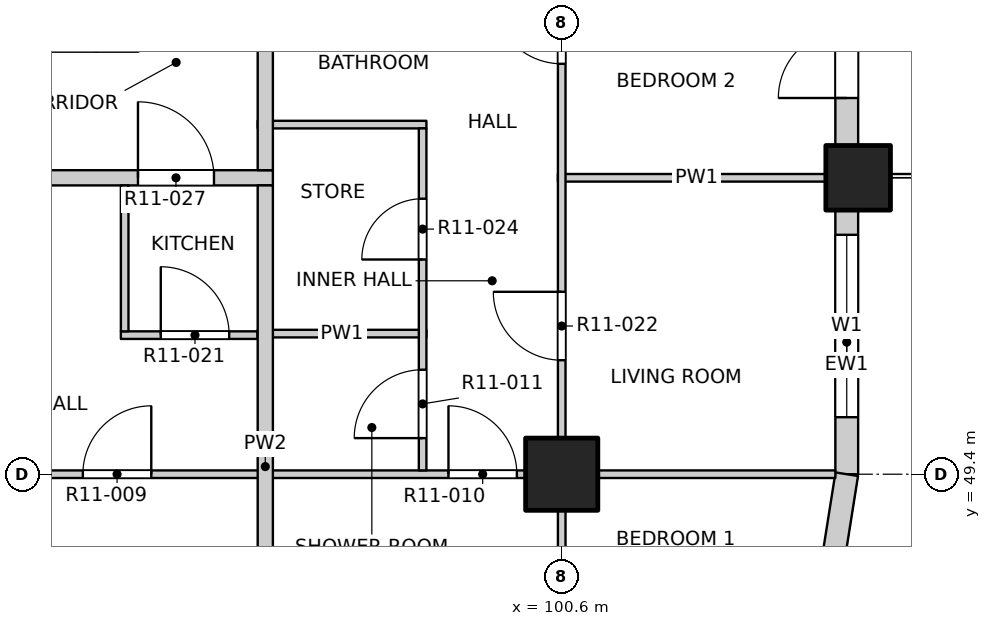
"""IFC4 building model, lengths in metres.
Left out: names, types, materials, properties, quantities, classifications, styles, units other than length and angle.
Written with IfcOpenShell. Run it as: python <this file> out.ifc"""

import sys

from ifc_helpers import new_model, si_unit, direction, frame, frame_2d, origin, origin_2d, place, context, subcontext, project, spatial, rectangle, extrude, element, fill, save


model = new_model("IFC4")
c1 = context("Model", 3, precision=1e-05, world=origin(), true_north=direction((0.0, 1.0)))
c2 = subcontext(c1, "Body", "Model", "MODEL_VIEW")
j1 = project(units=[si_unit("LENGTHUNIT", "METRE"), si_unit("PLANEANGLEUNIT", "RADIAN")], contexts=[c1])
p1 = place(None, origin())
s1 = spatial("IfcSite", under=j1, at=p1, CompositionType="ELEMENT")
p2 = place(p1, origin())
s2 = spatial("IfcBuilding", under=s1, at=p2, CompositionType="ELEMENT")
p3 = place(p2, frame((0.0, 0.0, 130.5)))
s3 = spatial("IfcBuildingStorey", under=s2, at=p3, CompositionType="ELEMENT", Elevation=130.5)
p4 = place(p3, frame((104.5, 53.3, -0.25), z_axis=(0.0, 0.0, 1.0), x_axis=(1.0, 0.0, 0.0)))
e1 = element("IfcColumn", 1, at=p4, inside=s3, PredefinedType="COLUMN", context=c2, shape_type="SweptSolid", body=[
    extrude(rectangle(XDim=0.85, YDim=0.85, at=origin_2d()), origin(), (0.0, 0.0, 1.0), 3.4),
])
p5 = place(p3, frame((100.6, 49.4, -0.25), z_axis=(0.0, 0.0, 1.0), x_axis=(1.0, 0.0, 0.0)))
e2 = element("IfcColumn", 2, at=p5, inside=s3, PredefinedType="COLUMN", context=c2, shape_type="SweptSolid", body=[
    extrude(rectangle(XDim=0.95, YDim=0.95, at=origin_2d()), origin(), (0.0, 0.0, 1.0), 3.4),
])
p6 = place(p3, frame((104.35, 49.4, 0.0), z_axis=(0.0, 0.0, 1.0), x_axis=(0.0, 1.0, 0.0)))
e3 = element("IfcWall", 3, at=p6, inside=s3, PredefinedType="SOLIDWALL", context=c2, shape_type="SweptSolid", body=[
    extrude(rectangle(XDim=3.475, YDim=0.3, at=frame_2d((1.738, 0.0))), origin(), (0.0, 0.0, 1.0), 2.7),
])
p7 = place(p6, frame((0.75, 0.0, 0.9)))
e4 = element("IfcOpeningElement", 4, at=p7, cuts=e3, PredefinedType="OPENING", context=c2, shape_type="SweptSolid", body=[
    extrude(rectangle(XDim=2.4, YDim=1.8, at=frame_2d((1.2, 0.9))), frame((0.0, 0.16, 0.0), z_axis=(0.0, -1.0, 0.0), x_axis=(1.0, 0.0, 0.0)), (0.0, 0.0, 1.0), 0.32),
])
p8 = place(p3, frame((104.35, 53.725, 0.0), z_axis=(0.0, 0.0, 1.0), x_axis=(0.0, 1.0, 0.0)))
e5 = element("IfcWall", 5, at=p8, inside=s3, PredefinedType="SOLIDWALL", context=c2, shape_type="SweptSolid", body=[
    extrude(rectangle(XDim=6.95, YDim=0.3, at=frame_2d((3.475, 0.0))), origin(), (0.0, 0.0, 1.0), 2.7),
])
p9 = place(p8, frame((0.625, 0.0, 0.0)))
e6 = element("IfcOpeningElement", 6, at=p9, cuts=e5, PredefinedType="OPENING", context=c2, shape_type="SweptSolid", body=[
    extrude(rectangle(XDim=1.8, YDim=2.4, at=frame_2d((0.9, 1.2))), frame((0.0, 0.16, 0.0), z_axis=(0.0, -1.0, 0.0), x_axis=(1.0, 0.0, 0.0)), (0.0, 0.0, 1.0), 0.32),
])
p10 = place(p8, frame((4.225, 0.0, 0.9)))
e7 = element("IfcOpeningElement", 7, at=p10, cuts=e5, PredefinedType="OPENING", context=c2, shape_type="SweptSolid", body=[
    extrude(rectangle(XDim=2.4, YDim=1.8, at=frame_2d((1.2, 0.9))), frame((0.0, 0.16, 0.0), z_axis=(0.0, -1.0, 0.0), x_axis=(1.0, 0.0, 0.0)), (0.0, 0.0, 1.0), 0.32),
])
p11 = place(p3, frame((104.167, 48.241, 0.0), z_axis=(0.0, 0.0, 1.0), x_axis=(0.156496880861, 0.987678452879, 0.0)))
e8 = element("IfcWall", 8, at=p11, inside=s3, PredefinedType="SOLIDWALL", context=c2, shape_type="SweptSolid", body=[
    extrude(rectangle(XDim=1.173, YDim=0.3, at=frame_2d((0.586, 0.0))), origin(), (0.0, 0.0, 1.0), 2.7),
])
p12 = place(p3, frame((65.8, 49.4, 0.0), z_axis=(0.0, 0.0, 1.0), x_axis=(1.0, 0.0, 0.0)))
e9 = element("IfcWall", 9, at=p12, inside=s3, PredefinedType="PARTITIONING", context=c2, shape_type="SweptSolid", body=[
    extrude(rectangle(XDim=38.4, YDim=0.1, at=frame_2d((19.2, 0.0))), origin(), (0.0, 0.0, 1.0), 3.15),
])
p13 = place(p12, frame((4.19, 0.0, 0.0)))
e10 = element("IfcOpeningElement", 10, at=p13, cuts=e9, PredefinedType="OPENING", context=c2, shape_type="SweptSolid", body=[
    extrude(rectangle(XDim=0.9, YDim=2.1, at=frame_2d((0.45, 1.05))), frame((0.0, 0.06, 0.0), z_axis=(0.0, -1.0, 0.0), x_axis=(1.0, 0.0, 0.0)), (0.0, 0.0, 1.0), 0.12),
])
p14 = place(p12, frame((9.0, 0.0, 0.0)))
e11 = element("IfcOpeningElement", 11, at=p14, cuts=e9, PredefinedType="OPENING", context=c2, shape_type="SweptSolid", body=[
    extrude(rectangle(XDim=0.9, YDim=2.1, at=frame_2d((0.45, 1.05))), frame((0.0, 0.06, 0.0), z_axis=(0.0, -1.0, 0.0), x_axis=(1.0, 0.0, 0.0)), (0.0, 0.0, 1.0), 0.12),
])
p15 = place(p12, frame((12.9, 0.0, 0.0)))
e12 = element("IfcOpeningElement", 12, at=p15, cuts=e9, PredefinedType="OPENING", context=c2, shape_type="SweptSolid", body=[
    extrude(rectangle(XDim=0.9, YDim=2.1, at=frame_2d((0.45, 1.05))), frame((0.0, 0.06, 0.0), z_axis=(0.0, -1.0, 0.0), x_axis=(1.0, 0.0, 0.0)), (0.0, 0.0, 1.0), 0.12),
])
p16 = place(p12, frame((16.8, 0.0, 0.0)))
e13 = element("IfcOpeningElement", 13, at=p16, cuts=e9, PredefinedType="OPENING", context=c2, shape_type="SweptSolid", body=[
    extrude(rectangle(XDim=0.9, YDim=2.1, at=frame_2d((0.45, 1.05))), frame((0.0, 0.06, 0.0), z_axis=(0.0, -1.0, 0.0), x_axis=(1.0, 0.0, 0.0)), (0.0, 0.0, 1.0), 0.12),
])
p17 = place(p12, frame((20.7, 0.0, 0.0)))
e14 = element("IfcOpeningElement", 14, at=p17, cuts=e9, PredefinedType="OPENING", context=c2, shape_type="SweptSolid", body=[
    extrude(rectangle(XDim=0.9, YDim=2.1, at=frame_2d((0.45, 1.05))), frame((0.0, 0.06, 0.0), z_axis=(0.0, -1.0, 0.0), x_axis=(1.0, 0.0, 0.0)), (0.0, 0.0, 1.0), 0.12),
])
p18 = place(p12, frame((24.6, 0.0, 0.0)))
e15 = element("IfcOpeningElement", 15, at=p18, cuts=e9, PredefinedType="OPENING", context=c2, shape_type="SweptSolid", body=[
    extrude(rectangle(XDim=0.9, YDim=2.1, at=frame_2d((0.45, 1.05))), frame((0.0, 0.06, 0.0), z_axis=(0.0, -1.0, 0.0), x_axis=(1.0, 0.0, 0.0)), (0.0, 0.0, 1.0), 0.12),
])
p19 = place(p12, frame((28.5, 0.0, 0.0)))
e16 = element("IfcOpeningElement", 16, at=p19, cuts=e9, PredefinedType="OPENING", context=c2, shape_type="SweptSolid", body=[
    extrude(rectangle(XDim=0.9, YDim=2.1, at=frame_2d((0.45, 1.05))), frame((0.0, 0.06, 0.0), z_axis=(0.0, -1.0, 0.0), x_axis=(1.0, 0.0, 0.0)), (0.0, 0.0, 1.0), 0.12),
])
p20 = place(p12, frame((33.31, 0.0, 0.0)))
e17 = element("IfcOpeningElement", 17, at=p20, cuts=e9, PredefinedType="OPENING", context=c2, shape_type="SweptSolid", body=[
    extrude(rectangle(XDim=0.9, YDim=2.1, at=frame_2d((0.45, 1.05))), frame((0.0, 0.06, 0.0), z_axis=(0.0, -1.0, 0.0), x_axis=(1.0, 0.0, 0.0)), (0.0, 0.0, 1.0), 0.12),
])
p21 = place(p3, frame((94.8, 51.23, 0.0), z_axis=(0.0, 0.0, 1.0), x_axis=(1.0, 0.0, 0.0)))
e18 = element("IfcWall", 18, at=p21, inside=s3, PredefinedType="PARTITIONING", context=c2, shape_type="SweptSolid", body=[
    extrude(rectangle(XDim=1.8, YDim=0.1, at=frame_2d((0.9, 0.0))), origin(), (0.0, 0.0, 1.0), 3.15),
])
p22 = place(p21, frame((0.525, 0.0, 0.0)))
e19 = element("IfcOpeningElement", 19, at=p22, cuts=e18, PredefinedType="OPENING", context=c2, shape_type="SweptSolid", body=[
    extrude(rectangle(XDim=0.9, YDim=2.1, at=frame_2d((0.45, 1.05))), frame((0.0, 0.06, 0.0), z_axis=(0.0, -1.0, 0.0), x_axis=(1.0, 0.0, 0.0)), (0.0, 0.0, 1.0), 0.12),
])
p23 = place(p3, frame((96.6, 51.25, 0.0), z_axis=(0.0, 0.0, 1.0), x_axis=(1.0, 0.0, 0.0)))
e20 = element("IfcWall", 20, at=p23, inside=s3, PredefinedType="PARTITIONING", context=c2, shape_type="SweptSolid", body=[
    extrude(rectangle(XDim=2.22, YDim=0.1, at=frame_2d((1.11, 0.0))), origin(), (0.0, 0.0, 1.0), 3.15),
])
p24 = place(p3, frame((73.2, 53.3, 0.0), z_axis=(0.0, 0.0, 1.0), x_axis=(1.0, 0.0, 0.0)))
e21 = element("IfcWall", 21, at=p24, inside=s3, PredefinedType="PARTITIONING", context=c2, shape_type="SweptSolid", body=[
    extrude(rectangle(XDim=23.6, YDim=0.2, at=frame_2d((11.8, 0.0))), origin(), (0.0, 0.0, 1.0), 3.15),
])
p25 = place(p24, frame((6.775, 0.0, 0.0)))
e22 = element("IfcOpeningElement", 22, at=p25, cuts=e21, PredefinedType="OPENING", context=c2, shape_type="SweptSolid", body=[
    extrude(rectangle(XDim=1.0, YDim=2.1, at=frame_2d((0.5, 1.05))), frame((0.0, 0.11, 0.0), z_axis=(0.0, -1.0, 0.0), x_axis=(1.0, 0.0, 0.0)), (0.0, 0.0, 1.0), 0.22),
])
p26 = place(p24, frame((21.825, 0.0, 0.0)))
e23 = element("IfcOpeningElement", 23, at=p26, cuts=e21, PredefinedType="OPENING", context=c2, shape_type="SweptSolid", body=[
    extrude(rectangle(XDim=1.0, YDim=2.1, at=frame_2d((0.5, 1.05))), frame((0.0, 0.11, 0.0), z_axis=(0.0, -1.0, 0.0), x_axis=(1.0, 0.0, 0.0)), (0.0, 0.0, 1.0), 0.22),
])
p27 = place(p3, frame((100.55, 53.3, 0.0), z_axis=(0.0, 0.0, 1.0), x_axis=(1.0, 0.0, 0.0)))
e24 = element("IfcWall", 24, at=p27, inside=s3, PredefinedType="PARTITIONING", context=c2, shape_type="SweptSolid", body=[
    extrude(rectangle(XDim=3.65, YDim=0.1, at=frame_2d((1.825, 0.0))), origin(), (0.0, 0.0, 1.0), 3.15),
])
p28 = place(p3, frame((96.6, 54.0, 0.0), z_axis=(0.0, 0.0, 1.0), x_axis=(1.0, 0.0, 0.0)))
e25 = element("IfcWall", 25, at=p28, inside=s3, PredefinedType="PARTITIONING", context=c2, shape_type="SweptSolid", body=[
    extrude(rectangle(XDim=2.22, YDim=0.1, at=frame_2d((1.11, 0.0))), origin(), (0.0, 0.0, 1.0), 3.15),
])
p29 = place(p3, frame((94.85, 51.28, 0.0), z_axis=(0.0, 0.0, 1.0), x_axis=(0.0, 1.0, 0.0)))
e26 = element("IfcWall", 26, at=p29, inside=s3, PredefinedType="PARTITIONING", context=c2, shape_type="SweptSolid", body=[
    extrude(rectangle(XDim=1.92, YDim=0.1, at=frame_2d((0.96, 0.0))), origin(), (0.0, 0.0, 1.0), 3.15),
])
p30 = place(p3, frame((96.7, 45.8, 0.0), z_axis=(0.0, 0.0, 1.0), x_axis=(0.0, 1.0, 0.0)))
e27 = element("IfcWall", 27, at=p30, inside=s3, PredefinedType="PARTITIONING", context=c2, shape_type="SweptSolid", body=[
    extrude(rectangle(XDim=7.4, YDim=0.2, at=frame_2d((3.7, 0.0))), origin(), (0.0, 0.0, 1.0), 3.15),
])
p31 = place(p3, frame((96.7, 53.4, 0.0), z_axis=(0.0, 0.0, 1.0), x_axis=(0.0, 1.0, 0.0)))
e28 = element("IfcWall", 28, at=p31, inside=s3, PredefinedType="PARTITIONING", context=c2, shape_type="SweptSolid", body=[
    extrude(rectangle(XDim=30.8, YDim=0.2, at=frame_2d((15.4, 0.0))), origin(), (0.0, 0.0, 1.0), 3.15),
])
p32 = place(p31, frame((1.875, 0.0, 0.0)))
e29 = element("IfcOpeningElement", 29, at=p32, cuts=e28, PredefinedType="OPENING", context=c2, shape_type="SweptSolid", body=[
    extrude(rectangle(XDim=1.0, YDim=2.1, at=frame_2d((0.5, 1.05))), frame((0.0, 0.11, 0.0), z_axis=(0.0, -1.0, 0.0), x_axis=(1.0, 0.0, 0.0)), (0.0, 0.0, 1.0), 0.22),
])
p33 = place(p31, frame((10.875, 0.0, 0.0)))
e30 = element("IfcOpeningElement", 30, at=p33, cuts=e28, PredefinedType="OPENING", context=c2, shape_type="SweptSolid", body=[
    extrude(rectangle(XDim=1.0, YDim=2.1, at=frame_2d((0.5, 1.05))), frame((0.0, 0.11, 0.0), z_axis=(0.0, -1.0, 0.0), x_axis=(1.0, 0.0, 0.0)), (0.0, 0.0, 1.0), 0.22),
])
p34 = place(p31, frame((25.725, 0.0, 0.0)))
e31 = element("IfcOpeningElement", 31, at=p34, cuts=e28, PredefinedType="OPENING", context=c2, shape_type="SweptSolid", body=[
    extrude(rectangle(XDim=1.0, YDim=2.1, at=frame_2d((0.5, 1.05))), frame((0.0, 0.11, 0.0), z_axis=(0.0, -1.0, 0.0), x_axis=(1.0, 0.0, 0.0)), (0.0, 0.0, 1.0), 0.22),
])
p35 = place(p3, frame((98.77, 49.45, 0.0), z_axis=(0.0, 0.0, 1.0), x_axis=(0.0, 1.0, 0.0)))
e32 = element("IfcWall", 32, at=p35, inside=s3, PredefinedType="PARTITIONING", context=c2, shape_type="SweptSolid", body=[
    extrude(rectangle(XDim=4.5, YDim=0.1, at=frame_2d((2.25, 0.0))), origin(), (0.0, 0.0, 1.0), 3.15),
])
p36 = place(p35, frame((0.425, 0.0, 0.0)))
e33 = element("IfcOpeningElement", 33, at=p36, cuts=e32, PredefinedType="OPENING", context=c2, shape_type="SweptSolid", body=[
    extrude(rectangle(XDim=0.9, YDim=2.1, at=frame_2d((0.45, 1.05))), frame((0.0, 0.06, 0.0), z_axis=(0.0, -1.0, 0.0), x_axis=(1.0, 0.0, 0.0)), (0.0, 0.0, 1.0), 0.12),
])
p37 = place(p35, frame((2.775, 0.0, 0.0)))
e34 = element("IfcOpeningElement", 34, at=p37, cuts=e32, PredefinedType="OPENING", context=c2, shape_type="SweptSolid", body=[
    extrude(rectangle(XDim=0.8, YDim=2.1, at=frame_2d((0.4, 1.05))), frame((0.0, 0.06, 0.0), z_axis=(0.0, -1.0, 0.0), x_axis=(1.0, 0.0, 0.0)), (0.0, 0.0, 1.0), 0.12),
])
p38 = place(p3, frame((100.6, 45.8, 0.0), z_axis=(0.0, 0.0, 1.0), x_axis=(0.0, 1.0, 0.0)))
e35 = element("IfcWall", 35, at=p38, inside=s3, PredefinedType="PARTITIONING", context=c2, shape_type="SweptSolid", body=[
    extrude(rectangle(XDim=38.4, YDim=0.1, at=frame_2d((19.2, 0.0))), origin(), (0.0, 0.0, 1.0), 3.15),
])
p39 = place(p38, frame((1.05, 0.0, 0.0)))
e36 = element("IfcOpeningElement", 36, at=p39, cuts=e35, PredefinedType="OPENING", context=c2, shape_type="SweptSolid", body=[
    extrude(rectangle(XDim=1.2, YDim=2.1, at=frame_2d((0.6, 1.05))), frame((0.0, 0.06, 0.0), z_axis=(0.0, -1.0, 0.0), x_axis=(1.0, 0.0, 0.0)), (0.0, 0.0, 1.0), 0.12),
])
p40 = place(p38, frame((5.1, 0.0, 0.0)))
e37 = element("IfcOpeningElement", 37, at=p40, cuts=e35, PredefinedType="OPENING", context=c2, shape_type="SweptSolid", body=[
    extrude(rectangle(XDim=0.9, YDim=2.1, at=frame_2d((0.45, 1.05))), frame((0.0, 0.06, 0.0), z_axis=(0.0, -1.0, 0.0), x_axis=(1.0, 0.0, 0.0)), (0.0, 0.0, 1.0), 0.12),
])
p41 = place(p38, frame((9.0, 0.0, 0.0)))
e38 = element("IfcOpeningElement", 38, at=p41, cuts=e35, PredefinedType="OPENING", context=c2, shape_type="SweptSolid", body=[
    extrude(rectangle(XDim=0.9, YDim=2.1, at=frame_2d((0.45, 1.05))), frame((0.0, 0.06, 0.0), z_axis=(0.0, -1.0, 0.0), x_axis=(1.0, 0.0, 0.0)), (0.0, 0.0, 1.0), 0.12),
])
p42 = place(p38, frame((12.9, 0.0, 0.0)))
e39 = element("IfcOpeningElement", 39, at=p42, cuts=e35, PredefinedType="OPENING", context=c2, shape_type="SweptSolid", body=[
    extrude(rectangle(XDim=0.9, YDim=2.1, at=frame_2d((0.45, 1.05))), frame((0.0, 0.06, 0.0), z_axis=(0.0, -1.0, 0.0), x_axis=(1.0, 0.0, 0.0)), (0.0, 0.0, 1.0), 0.12),
])
p43 = place(p38, frame((16.8, 0.0, 0.0)))
e40 = element("IfcOpeningElement", 40, at=p43, cuts=e35, PredefinedType="OPENING", context=c2, shape_type="SweptSolid", body=[
    extrude(rectangle(XDim=0.9, YDim=2.1, at=frame_2d((0.45, 1.05))), frame((0.0, 0.06, 0.0), z_axis=(0.0, -1.0, 0.0), x_axis=(1.0, 0.0, 0.0)), (0.0, 0.0, 1.0), 0.12),
])
p44 = place(p38, frame((20.7, 0.0, 0.0)))
e41 = element("IfcOpeningElement", 41, at=p44, cuts=e35, PredefinedType="OPENING", context=c2, shape_type="SweptSolid", body=[
    extrude(rectangle(XDim=0.9, YDim=2.1, at=frame_2d((0.45, 1.05))), frame((0.0, 0.06, 0.0), z_axis=(0.0, -1.0, 0.0), x_axis=(1.0, 0.0, 0.0)), (0.0, 0.0, 1.0), 0.12),
])
p45 = place(p38, frame((24.6, 0.0, 0.0)))
e42 = element("IfcOpeningElement", 42, at=p45, cuts=e35, PredefinedType="OPENING", context=c2, shape_type="SweptSolid", body=[
    extrude(rectangle(XDim=0.9, YDim=2.1, at=frame_2d((0.45, 1.05))), frame((0.0, 0.06, 0.0), z_axis=(0.0, -1.0, 0.0), x_axis=(1.0, 0.0, 0.0)), (0.0, 0.0, 1.0), 0.12),
])
p46 = place(p38, frame((30.3, 0.0, 0.0)))
e43 = element("IfcOpeningElement", 43, at=p46, cuts=e35, PredefinedType="OPENING", context=c2, shape_type="SweptSolid", body=[
    extrude(rectangle(XDim=1.2, YDim=2.1, at=frame_2d((0.6, 1.05))), frame((0.0, 0.06, 0.0), z_axis=(0.0, -1.0, 0.0), x_axis=(1.0, 0.0, 0.0)), (0.0, 0.0, 1.0), 0.12),
])
p47 = place(p38, frame((36.15, 0.0, 0.0)))
e44 = element("IfcOpeningElement", 44, at=p47, cuts=e35, PredefinedType="OPENING", context=c2, shape_type="SweptSolid", body=[
    extrude(rectangle(XDim=1.2, YDim=2.1, at=frame_2d((0.6, 1.05))), frame((0.0, 0.06, 0.0), z_axis=(0.0, -1.0, 0.0), x_axis=(1.0, 0.0, 0.0)), (0.0, 0.0, 1.0), 0.12),
])
p48 = place(p7, origin())
e45 = element("IfcWindow", 45, at=p48, inside=s3, PartitioningType="DOUBLE_PANEL_VERTICAL", PredefinedType="WINDOW", context=c2, shape_type="SweptSolid", body=[
    extrude(rectangle(XDim=2.4, YDim=1.8, at=frame_2d((1.2, 0.9))), frame((0.0, 0.03, 0.0), z_axis=(0.0, -1.0, 0.0), x_axis=(1.0, 0.0, 0.0)), (0.0, 0.0, 1.0), 0.06),
])
fill(e4, e45)
p49 = place(p9, origin())
e46 = element("IfcDoor", 46, at=p49, inside=s3, OperationType="DOUBLE_DOOR_SINGLE_SWING", PredefinedType="DOOR", context=c2, shape_type="SweptSolid", body=[
    extrude(rectangle(XDim=1.8, YDim=2.4, at=frame_2d((0.9, 1.2))), frame((0.0, 0.025, 0.0), z_axis=(0.0, -1.0, 0.0), x_axis=(1.0, 0.0, 0.0)), (0.0, 0.0, 1.0), 0.05),
])
fill(e6, e46)
p50 = place(p19, origin())
e47 = element("IfcDoor", 47, at=p50, inside=s3, OperationType="SINGLE_SWING_RIGHT", PredefinedType="DOOR", context=c2, shape_type="SweptSolid", body=[
    extrude(rectangle(XDim=0.9, YDim=2.1, at=frame_2d((0.45, 1.05))), frame((0.0, 0.025, 0.0), z_axis=(0.0, -1.0, 0.0), x_axis=(1.0, 0.0, 0.0)), (0.0, 0.0, 1.0), 0.05),
])
fill(e16, e47)
p51 = place(p20, origin())
e48 = element("IfcDoor", 48, at=p51, inside=s3, OperationType="SINGLE_SWING_LEFT", PredefinedType="DOOR", context=c2, shape_type="SweptSolid", body=[
    extrude(rectangle(XDim=0.9, YDim=2.1, at=frame_2d((0.45, 1.05))), frame((0.0, 0.025, 0.0), z_axis=(0.0, -1.0, 0.0), x_axis=(1.0, 0.0, 0.0)), (0.0, 0.0, 1.0), 0.05),
])
fill(e17, e48)
p52 = place(p36, origin())
e49 = element("IfcDoor", 49, at=p52, inside=s3, OperationType="SINGLE_SWING_LEFT", PredefinedType="DOOR", context=c2, shape_type="SweptSolid", body=[
    extrude(rectangle(XDim=0.9, YDim=2.1, at=frame_2d((0.45, 1.05))), frame((0.0, 0.025, 0.0), z_axis=(0.0, -1.0, 0.0), x_axis=(1.0, 0.0, 0.0)), (0.0, 0.0, 1.0), 0.05),
])
fill(e33, e49)
p53 = place(p22, origin())
e50 = element("IfcDoor", 50, at=p53, inside=s3, OperationType="SINGLE_SWING_LEFT", PredefinedType="DOOR", context=c2, shape_type="SweptSolid", body=[
    extrude(rectangle(XDim=0.9, YDim=2.1, at=frame_2d((0.45, 1.05))), frame((0.0, 0.025, 0.0), z_axis=(0.0, -1.0, 0.0), x_axis=(1.0, 0.0, 0.0)), (0.0, 0.0, 1.0), 0.05),
])
fill(e19, e50)
p54 = place(p40, origin())
e51 = element("IfcDoor", 51, at=p54, inside=s3, OperationType="SINGLE_SWING_RIGHT", PredefinedType="DOOR", context=c2, shape_type="SweptSolid", body=[
    extrude(rectangle(XDim=0.9, YDim=2.1, at=frame_2d((0.45, 1.05))), frame((0.0, 0.025, 0.0), z_axis=(0.0, -1.0, 0.0), x_axis=(1.0, 0.0, 0.0)), (0.0, 0.0, 1.0), 0.05),
])
fill(e37, e51)
p55 = place(p37, origin())
e52 = element("IfcDoor", 52, at=p55, inside=s3, OperationType="SINGLE_SWING_LEFT", PredefinedType="DOOR", context=c2, shape_type="SweptSolid", body=[
    extrude(rectangle(XDim=0.8, YDim=2.1, at=frame_2d((0.4, 1.05))), frame((0.0, 0.025, 0.0), z_axis=(0.0, -1.0, 0.0), x_axis=(1.0, 0.0, 0.0)), (0.0, 0.0, 1.0), 0.05),
])
fill(e34, e52)
p56 = place(p26, origin())
e53 = element("IfcDoor", 53, at=p56, inside=s3, OperationType="SINGLE_SWING_LEFT", PredefinedType="DOOR", context=c2, shape_type="SweptSolid", body=[
    extrude(rectangle(XDim=1.0, YDim=2.1, at=frame_2d((0.5, 1.05))), frame((0.0, 0.025, 0.0), z_axis=(0.0, -1.0, 0.0), x_axis=(1.0, 0.0, 0.0)), (0.0, 0.0, 1.0), 0.05),
])
fill(e23, e53)
p57 = place(p41, origin())
e54 = element("IfcDoor", 54, at=p57, inside=s3, OperationType="SINGLE_SWING_RIGHT", PredefinedType="DOOR", context=c2, shape_type="SweptSolid", body=[
    extrude(rectangle(XDim=0.9, YDim=2.1, at=frame_2d((0.45, 1.05))), frame((0.0, 0.025, 0.0), z_axis=(0.0, -1.0, 0.0), x_axis=(1.0, 0.0, 0.0)), (0.0, 0.0, 1.0), 0.05),
])
fill(e38, e54)
save(model, sys.argv[1])
